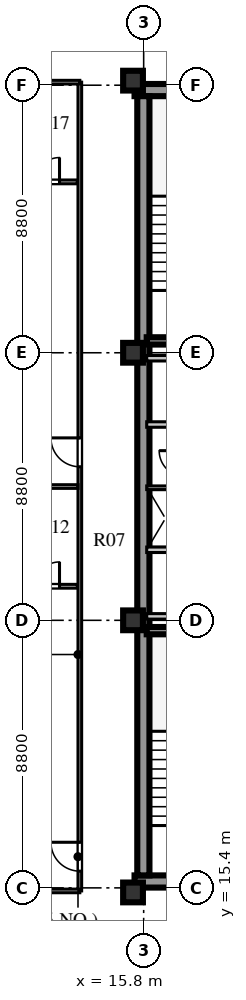
"""IFC4 building model, lengths in metres.
Left out: names, types, materials, properties, quantities, classifications, styles, units other than length and angle.
Written with IfcOpenShell. Run it as: python <this file> out.ifc"""

import sys

from ifc_helpers import new_model, si_unit, direction, frame, frame_2d, origin, origin_2d, place, context, subcontext, project, spatial, rectangle, extrude, element, fill, save


model = new_model("IFC4")
c1 = context("Model", 3, precision=1e-05, world=origin(), true_north=direction((0.0, 1.0)))
c2 = subcontext(c1, "Body", "Model", "MODEL_VIEW")
j1 = project(units=[si_unit("LENGTHUNIT", "METRE"), si_unit("PLANEANGLEUNIT", "RADIAN")], contexts=[c1])
p1 = place(None, origin())
s1 = spatial("IfcSite", under=j1, at=p1, CompositionType="ELEMENT")
p2 = place(p1, origin())
s2 = spatial("IfcBuilding", under=s1, at=p2, CompositionType="ELEMENT")
p3 = place(p2, frame((0.0, 0.0, 221.9)))
s3 = spatial("IfcBuildingStorey", under=s2, at=p3, CompositionType="ELEMENT", Elevation=221.9)
for number, where, z_axis, x_axis in (
    (1, (15.5, 15.61, 0.0), (0.0, 0.0, 1.0), (1.0, 0.0, 0.0)),
    (2, (15.5, 41.64, 0.0), (0.0, 0.0, 1.0), (1.0, 0.0, 0.0)),
):
    element("IfcWall", number, at=place(p3, frame(where, z_axis=z_axis, x_axis=x_axis)), inside=s3, PredefinedType="SHEAR", context=c2, shape_type="SweptSolid", body=[
        extrude(rectangle(XDim=9.48, YDim=0.4, at=frame_2d((4.74, 0.0))), origin(), (0.0, 0.0, 1.0), 3.66),
    ])
p4 = place(p3, frame((15.79, 15.81, 0.0), z_axis=(0.0, 0.0, 1.0), x_axis=(0.0, 1.0, 0.0)))
e3 = element("IfcWall", 3, at=p4, inside=s3, PredefinedType="SHEAR", context=c2, shape_type="SweptSolid", body=[
    extrude(rectangle(XDim=25.63, YDim=0.4, at=frame_2d((12.815, 0.0))), origin(), (0.0, 0.0, 1.0), 3.66),
])
for number, where, z_axis, x_axis in (
    (4, (15.45, 15.25, 0.0), (0.0, 0.0, 1.0), (1.0, 0.0, 0.0)),
    (5, (15.45, 24.2, 0.0), (0.0, 0.0, 1.0), (1.0, 0.0, 0.0)),
    (6, (15.45, 33.0, 0.0), (0.0, 0.0, 1.0), (1.0, 0.0, 0.0)),
    (7, (15.45, 41.95, 0.0), (0.0, 0.0, 1.0), (1.0, 0.0, 0.0)),
):
    element("IfcColumn", number, at=place(p3, frame(where, z_axis=z_axis, x_axis=x_axis)), inside=s3, PredefinedType="COLUMN", context=c2, shape_type="SweptSolid", body=[
        extrude(rectangle(XDim=0.65, YDim=0.65, at=origin_2d()), origin(), (0.0, 0.0, 1.0), 3.66),
    ])
p5 = place(p3, frame((15.9, 23.86, 0.0), z_axis=(0.0, 0.0, 1.0), x_axis=(1.0, 0.0, 0.0)))
e8 = element("IfcWall", 8, at=p5, inside=s3, PredefinedType="SHEAR", context=c2, shape_type="SweptSolid", body=[
    extrude(rectangle(XDim=3.52, YDim=0.24, at=frame_2d((1.76, 0.0))), origin(), (0.0, 0.0, 1.0), 3.9),
])
p6 = place(p3, frame((15.9, 26.52, 0.0), z_axis=(0.0, 0.0, 1.0), x_axis=(1.0, 0.0, 0.0)))
e9 = element("IfcWall", 9, at=p6, inside=s3, PredefinedType="SOLIDWALL", context=c2, shape_type="SweptSolid", body=[
    extrude(rectangle(XDim=8.68, YDim=0.18, at=frame_2d((4.34, 0.0))), origin(), (0.0, 0.0, 1.0), 3.66),
])
p7 = place(p6, frame((3.3, 0.0, 0.0)))
e10 = element("IfcOpeningElement", 10, at=p7, cuts=e9, PredefinedType="OPENING", context=c2, shape_type="SweptSolid", body=[
    extrude(rectangle(XDim=0.95, YDim=2.1, at=frame_2d((0.475, 1.05))), frame((0.0, 0.1, 0.0), z_axis=(0.0, -1.0, 0.0), x_axis=(1.0, 0.0, 0.0)), (0.0, 0.0, 1.0), 0.2),
])
p8 = place(p3, frame((15.9, 24.33, 0.0), z_axis=(0.0, 0.0, 1.0), x_axis=(1.0, 0.0, 0.0)))
e11 = element("IfcWall", 11, at=p8, inside=s3, PredefinedType="SOLIDWALL", context=c2, shape_type="SweptSolid", body=[
    extrude(rectangle(XDim=8.68, YDim=0.18, at=frame_2d((4.34, 0.0))), origin(), (0.0, 0.0, 1.0), 3.06),
])
p9 = place(p3, frame((15.9, 28.56, 0.0), z_axis=(0.0, 0.0, 1.0), x_axis=(1.0, 0.0, 0.0)))
e12 = element("IfcWall", 12, at=p9, inside=s3, PredefinedType="PARTITIONING", context=c2, shape_type="SweptSolid", body=[
    extrude(rectangle(XDim=1.2, YDim=0.12, at=frame_2d((0.6, 0.0))), origin(), (0.0, 0.0, 1.0), 3.66),
])
p10 = place(p3, frame((15.9, 30.64, 0.0), z_axis=(0.0, 0.0, 1.0), x_axis=(1.0, 0.0, 0.0)))
e13 = element("IfcWall", 13, at=p10, inside=s3, PredefinedType="SOLIDWALL", context=c2, shape_type="SweptSolid", body=[
    extrude(rectangle(XDim=8.68, YDim=0.18, at=frame_2d((4.34, 0.0))), origin(), (0.0, 0.0, 1.0), 3.66),
])
p11 = place(p10, frame((3.7, 0.0, 0.0)))
e14 = element("IfcOpeningElement", 14, at=p11, cuts=e13, PredefinedType="OPENING", context=c2, shape_type="SweptSolid", body=[
    extrude(rectangle(XDim=0.95, YDim=2.1, at=frame_2d((0.475, 1.05))), frame((0.0, 0.1, 0.0), z_axis=(0.0, -1.0, 0.0), x_axis=(1.0, 0.0, 0.0)), (0.0, 0.0, 1.0), 0.2),
])
p12 = place(p3, frame((15.9, 32.82, 0.0), z_axis=(0.0, 0.0, 1.0), x_axis=(1.0, 0.0, 0.0)))
e15 = element("IfcWall", 15, at=p12, inside=s3, PredefinedType="SOLIDWALL", context=c2, shape_type="SweptSolid", body=[
    extrude(rectangle(XDim=8.68, YDim=0.18, at=frame_2d((4.34, 0.0))), origin(), (0.0, 0.0, 1.0), 3.06),
])
p13 = place(p3, frame((15.9, 33.39, 0.0), z_axis=(0.0, 0.0, 1.0), x_axis=(1.0, 0.0, 0.0)))
e16 = element("IfcWall", 16, at=p13, inside=s3, PredefinedType="SHEAR", context=c2, shape_type="SweptSolid", body=[
    extrude(rectangle(XDim=3.52, YDim=0.24, at=frame_2d((1.76, 0.0))), origin(), (0.0, 0.0, 1.0), 3.9),
])
p14 = place(p3, frame((13.7, 15.3, 0.0), z_axis=(0.0, 0.0, 1.0), x_axis=(0.0, 1.0, 0.0)))
e17 = element("IfcWall", 17, at=p14, inside=s3, PredefinedType="PARTITIONING", context=c2, shape_type="SweptSolid", body=[
    extrude(rectangle(XDim=26.6, YDim=0.12, at=frame_2d((13.3, 0.0))), origin(), (0.0, 0.0, 1.0), 3.66),
])
p15 = place(p14, frame((0.65, 0.0, 0.0)))
e18 = element("IfcOpeningElement", 18, at=p15, cuts=e17, PredefinedType="OPENING", context=c2, shape_type="SweptSolid", body=[
    extrude(rectangle(XDim=0.95, YDim=2.1, at=frame_2d((0.475, 1.05))), frame((0.0, 0.07, 0.0), z_axis=(0.0, -1.0, 0.0), x_axis=(1.0, 0.0, 0.0)), (0.0, 0.0, 1.0), 0.14),
])
p16 = place(p14, frame((13.95, 0.0, 0.0)))
e19 = element("IfcOpeningElement", 19, at=p16, cuts=e17, PredefinedType="OPENING", context=c2, shape_type="SweptSolid", body=[
    extrude(rectangle(XDim=0.95, YDim=2.1, at=frame_2d((0.475, 1.05))), frame((0.0, 0.07, 0.0), z_axis=(0.0, -1.0, 0.0), x_axis=(1.0, 0.0, 0.0)), (0.0, 0.0, 1.0), 0.14),
])
for number, where, z_axis, x_axis in (
    (20, (8.08, 15.3, 0.0), (0.0, 0.0, 1.0), (1.0, 0.0, 0.0)),
    (21, (8.08, 41.9, 0.0), (0.0, 0.0, 1.0), (1.0, 0.0, 0.0)),
):
    element("IfcWall", number, at=place(p3, frame(where, z_axis=z_axis, x_axis=x_axis)), inside=s3, PredefinedType="PARTITIONING", context=c2, shape_type="SweptSolid", body=[
        extrude(rectangle(XDim=5.62, YDim=0.12, at=frame_2d((2.81, 0.0))), origin(), (0.0, 0.0, 1.0), 3.21),
    ])
p17 = place(p3, frame((10.45, 25.32, 0.0), z_axis=(0.0, 0.0, 1.0), x_axis=(1.0, 0.0, 0.0)))
e22 = element("IfcWall", 22, at=p17, inside=s3, PredefinedType="PLUMBINGWALL", context=c2, shape_type="SweptSolid", body=[
    extrude(rectangle(XDim=3.17, YDim=0.125, at=frame_2d((1.585, 0.0))), origin(), (0.0, 0.0, 1.0), 3.66),
])
p18 = place(p17, frame((0.16, 0.0, 0.0)))
e23 = element("IfcOpeningElement", 23, at=p18, cuts=e22, PredefinedType="OPENING", context=c2, shape_type="SweptSolid", body=[
    extrude(rectangle(XDim=0.8, YDim=2.05, at=frame_2d((0.4, 1.025))), frame((0.0, 0.073, 0.0), z_axis=(0.0, -1.0, 0.0), x_axis=(1.0, 0.0, 0.0)), (0.0, 0.0, 1.0), 0.145),
])
p19 = place(p17, frame((1.782, 0.0, 0.0)))
e24 = element("IfcOpeningElement", 24, at=p19, cuts=e22, PredefinedType="OPENING", context=c2, shape_type="SweptSolid", body=[
    extrude(rectangle(XDim=0.8, YDim=2.05, at=frame_2d((0.4, 1.025))), frame((0.0, 0.073, 0.0), z_axis=(0.0, -1.0, 0.0), x_axis=(1.0, 0.0, 0.0)), (0.0, 0.0, 1.0), 0.145),
])
p20 = place(p3, frame((8.08, 28.6, 0.0), z_axis=(0.0, 0.0, 1.0), x_axis=(1.0, 0.0, 0.0)))
e25 = element("IfcWall", 25, at=p20, inside=s3, PredefinedType="PARTITIONING", context=c2, shape_type="SweptSolid", body=[
    extrude(rectangle(XDim=5.56, YDim=0.12, at=frame_2d((2.78, 0.0))), origin(), (0.0, 0.0, 1.0), 3.66),
])
p21 = place(p3, frame((10.45, 38.62, 0.0), z_axis=(0.0, 0.0, 1.0), x_axis=(1.0, 0.0, 0.0)))
e26 = element("IfcWall", 26, at=p21, inside=s3, PredefinedType="PLUMBINGWALL", context=c2, shape_type="SweptSolid", body=[
    extrude(rectangle(XDim=3.17, YDim=0.125, at=frame_2d((1.585, 0.0))), origin(), (0.0, 0.0, 1.0), 3.66),
])
p22 = place(p21, frame((0.16, 0.0, 0.0)))
e27 = element("IfcOpeningElement", 27, at=p22, cuts=e26, PredefinedType="OPENING", context=c2, shape_type="SweptSolid", body=[
    extrude(rectangle(XDim=0.8, YDim=2.05, at=frame_2d((0.4, 1.025))), frame((0.0, 0.073, 0.0), z_axis=(0.0, -1.0, 0.0), x_axis=(1.0, 0.0, 0.0)), (0.0, 0.0, 1.0), 0.145),
])
p23 = place(p21, frame((1.782, 0.0, 0.0)))
e28 = element("IfcOpeningElement", 28, at=p23, cuts=e26, PredefinedType="OPENING", context=c2, shape_type="SweptSolid", body=[
    extrude(rectangle(XDim=0.8, YDim=2.05, at=frame_2d((0.4, 1.025))), frame((0.0, 0.073, 0.0), z_axis=(0.0, -1.0, 0.0), x_axis=(1.0, 0.0, 0.0)), (0.0, 0.0, 1.0), 0.145),
])
p24 = place(p19, origin())
e29 = element("IfcDoor", 29, at=p24, inside=s3, OperationType="SINGLE_SWING_RIGHT", PredefinedType="DOOR", context=c2, shape_type="SweptSolid", body=[
    extrude(rectangle(XDim=0.8, YDim=2.05, at=frame_2d((0.4, 1.025))), frame((0.0, 0.025, 0.0), z_axis=(0.0, -1.0, 0.0), x_axis=(1.0, 0.0, 0.0)), (0.0, 0.0, 1.0), 0.05),
])
fill(e24, e29)
p25 = place(p15, frame((0.95, 0.0, 0.0), z_axis=(0.0, 0.0, 1.0), x_axis=(-1.0, 0.0, 0.0)))
e30 = element("IfcDoor", 30, at=p25, inside=s3, OperationType="SINGLE_SWING_LEFT", PredefinedType="DOOR", context=c2, shape_type="SweptSolid", body=[
    extrude(rectangle(XDim=0.95, YDim=2.1, at=frame_2d((0.475, 1.05))), frame((0.0, 0.025, 0.0), z_axis=(0.0, -1.0, 0.0), x_axis=(1.0, 0.0, 0.0)), (0.0, 0.0, 1.0), 0.05),
])
fill(e18, e30)
p26 = place(p23, origin())
e31 = element("IfcDoor", 31, at=p26, inside=s3, OperationType="SINGLE_SWING_RIGHT", PredefinedType="DOOR", context=c2, shape_type="SweptSolid", body=[
    extrude(rectangle(XDim=0.8, YDim=2.05, at=frame_2d((0.4, 1.025))), frame((0.0, 0.025, 0.0), z_axis=(0.0, -1.0, 0.0), x_axis=(1.0, 0.0, 0.0)), (0.0, 0.0, 1.0), 0.05),
])
fill(e28, e31)
p27 = place(p16, frame((0.95, 0.0, 0.0), z_axis=(0.0, 0.0, 1.0), x_axis=(-1.0, 0.0, 0.0)))
e32 = element("IfcDoor", 32, at=p27, inside=s3, OperationType="SINGLE_SWING_LEFT", PredefinedType="DOOR", context=c2, shape_type="SweptSolid", body=[
    extrude(rectangle(XDim=0.95, YDim=2.1, at=frame_2d((0.475, 1.05))), frame((0.0, 0.025, 0.0), z_axis=(0.0, -1.0, 0.0), x_axis=(1.0, 0.0, 0.0)), (0.0, 0.0, 1.0), 0.05),
])
fill(e19, e32)
save(model, sys.argv[1])
